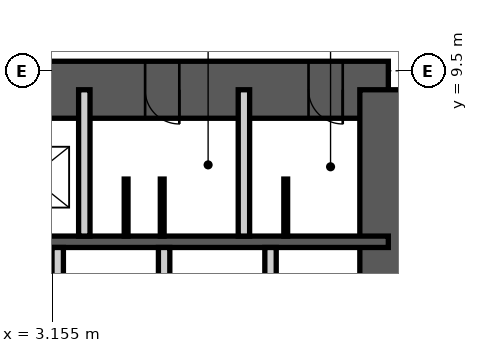
"""IFC4 building model, lengths in metres.
Left out: names, types, materials, properties, quantities, classifications, styles, units other than length and angle.
Written with IfcOpenShell. Run it as: python <this file> out.ifc"""

import sys

from ifc_helpers import new_model, si_unit, direction, frame, frame_2d, origin, place, context, subcontext, project, spatial, rectangle, extrude, element, fill, save


model = new_model("IFC4")
c1 = context("Model", 3, precision=1e-05, world=origin(), true_north=direction((0.0, 1.0)))
c2 = subcontext(c1, "Body", "Model", "MODEL_VIEW")
j1 = project(units=[si_unit("LENGTHUNIT", "METRE"), si_unit("PLANEANGLEUNIT", "RADIAN")], contexts=[c1])
p1 = place(None, origin())
s1 = spatial("IfcSite", under=j1, at=p1, CompositionType="ELEMENT")
p2 = place(p1, origin())
s2 = spatial("IfcBuilding", under=s1, at=p2, CompositionType="ELEMENT")
p3 = place(p2, frame((0.0, 0.0, -12.0)))
s3 = spatial("IfcBuildingStorey", under=s2, at=p3, CompositionType="ELEMENT", Elevation=-12.0)
p4 = place(p3, frame((-12.0, 9.0, -0.2), z_axis=(0.0, 0.0, 1.0), x_axis=(1.0, 0.0, 0.0)))
e1 = element("IfcWall", 1, at=p4, inside=s3, PredefinedType="SHEAR", context=c2, shape_type="SweptSolid", body=[
    extrude(rectangle(XDim=24.0, YDim=1.5, at=frame_2d((12.0, 0.0))), origin(), (0.0, 0.0, 1.0), 6.2),
])
p5 = place(p4, frame((10.4, 0.0, 0.2)))
e2 = element("IfcOpeningElement", 2, at=p5, cuts=e1, PredefinedType="OPENING", context=c2, shape_type="SweptSolid", body=[
    extrude(rectangle(XDim=1.0, YDim=2.1, at=frame_2d((0.5, 1.05))), frame((0.0, 0.76, 0.0), z_axis=(0.0, -1.0, 0.0), x_axis=(1.0, 0.0, 0.0)), (0.0, 0.0, 1.0), 1.52),
])
p6 = place(p4, frame((17.6, 0.0, 0.2)))
e3 = element("IfcOpeningElement", 3, at=p6, cuts=e1, PredefinedType="OPENING", context=c2, shape_type="SweptSolid", body=[
    extrude(rectangle(XDim=0.9, YDim=2.1, at=frame_2d((0.45, 1.05))), frame((0.0, 0.76, 0.0), z_axis=(0.0, -1.0, 0.0), x_axis=(1.0, 0.0, 0.0)), (0.0, 0.0, 1.0), 1.52),
])
p7 = place(p4, frame((21.9, 0.0, 0.2)))
e4 = element("IfcOpeningElement", 4, at=p7, cuts=e1, PredefinedType="OPENING", context=c2, shape_type="SweptSolid", body=[
    extrude(rectangle(XDim=0.9, YDim=2.1, at=frame_2d((0.45, 1.05))), frame((0.0, 0.76, 0.0), z_axis=(0.0, -1.0, 0.0), x_axis=(1.0, 0.0, 0.0)), (0.0, 0.0, 1.0), 1.52),
])
p8 = place(p3, frame((12.0, -9.0, -0.2), z_axis=(0.0, 0.0, 1.0), x_axis=(0.0, 1.0, 0.0)))
e5 = element("IfcWall", 5, at=p8, inside=s3, PredefinedType="SHEAR", context=c2, shape_type="SweptSolid", body=[
    extrude(rectangle(XDim=18.0, YDim=1.5, at=frame_2d((9.0, 0.0))), origin(), (0.0, 0.0, 1.0), 6.2),
])
p9 = place(p8, frame((8.1, 0.0, 0.2)))
e6 = element("IfcOpeningElement", 6, at=p9, cuts=e5, PredefinedType="OPENING", context=c2, shape_type="SweptSolid", body=[
    extrude(rectangle(XDim=1.8, YDim=2.1, at=frame_2d((0.9, 1.05))), frame((0.0, 0.76, 0.0), z_axis=(0.0, -1.0, 0.0), x_axis=(1.0, 0.0, 0.0)), (0.0, 0.0, 1.0), 1.52),
])
p10 = place(p3, frame((-12.0, 5.0, -0.2), z_axis=(0.0, 0.0, 1.0), x_axis=(1.0, 0.0, 0.0)))
e7 = element("IfcWall", 7, at=p10, inside=s3, PredefinedType="SHEAR", context=c2, shape_type="SweptSolid", body=[
    extrude(rectangle(XDim=24.0, YDim=0.3, at=frame_2d((12.0, 0.0))), origin(), (0.0, 0.0, 1.0), 6.2),
])
for number, where, z_axis, x_axis in (
    (8, (4.0, 5.15, 0.0), (0.0, 0.0, 1.0), (0.0, 1.0, 0.0)),
    (9, (8.2, 5.15, 0.0), (0.0, 0.0, 1.0), (0.0, 1.0, 0.0)),
):
    element("IfcWall", number, at=place(p3, frame(where, z_axis=z_axis, x_axis=x_axis)), inside=s3, PredefinedType="PARTITIONING", context=c2, shape_type="SweptSolid", body=[
        extrude(rectangle(XDim=3.85, YDim=0.3, at=frame_2d((1.925, 0.0))), origin(), (0.0, 0.0, 1.0), 5.78),
    ])
for number, where, z_axis, x_axis in (
    (10, (3.3, 2.2, 0.0), (0.0, 0.0, 1.0), (0.0, 1.0, 0.0)),
    (11, (6.1, 2.2, 0.0), (0.0, 0.0, 1.0), (0.0, 1.0, 0.0)),
    (12, (8.9, 2.2, 0.0), (0.0, 0.0, 1.0), (0.0, 1.0, 0.0)),
):
    element("IfcWall", number, at=place(p3, frame(where, z_axis=z_axis, x_axis=x_axis)), inside=s3, PredefinedType="PARTITIONING", context=c2, shape_type="SweptSolid", body=[
        extrude(rectangle(XDim=2.65, YDim=0.3, at=frame_2d((1.325, 0.0))), origin(), (0.0, 0.0, 1.0), 5.78),
    ])
for number, where, z_axis, x_axis in (
    (13, (5.1, 5.15, 0.0), (0.0, 0.0, 1.0), (0.0, 1.0, 0.0)),
    (14, (6.05, 5.15, 0.0), (0.0, 0.0, 1.0), (0.0, 1.0, 0.0)),
    (15, (9.3, 5.15, 0.0), (0.0, 0.0, 1.0), (0.0, 1.0, 0.0)),
):
    element("IfcWall", number, at=place(p3, frame(where, z_axis=z_axis, x_axis=x_axis)), inside=s3, PredefinedType="PARTITIONING", context=c2, shape_type="SweptSolid", body=[
        extrude(rectangle(XDim=1.5, YDim=0.1, at=frame_2d((0.75, 0.0))), origin(), (0.0, 0.0, 1.0), 2.1),
    ])
p11 = place(p6, origin())
e16 = element("IfcDoor", 16, at=p11, inside=s3, OperationType="SINGLE_SWING_RIGHT", PredefinedType="DOOR", context=c2, shape_type="SweptSolid", body=[
    extrude(rectangle(XDim=0.9, YDim=2.1, at=frame_2d((0.45, 1.05))), frame((0.0, 0.025, 0.0), z_axis=(0.0, -1.0, 0.0), x_axis=(1.0, 0.0, 0.0)), (0.0, 0.0, 1.0), 0.05),
])
fill(e3, e16)
p12 = place(p7, origin())
e17 = element("IfcDoor", 17, at=p12, inside=s3, OperationType="SINGLE_SWING_RIGHT", PredefinedType="DOOR", context=c2, shape_type="SweptSolid", body=[
    extrude(rectangle(XDim=0.9, YDim=2.1, at=frame_2d((0.45, 1.05))), frame((0.0, 0.025, 0.0), z_axis=(0.0, -1.0, 0.0), x_axis=(1.0, 0.0, 0.0)), (0.0, 0.0, 1.0), 0.05),
])
fill(e4, e17)
save(model, sys.argv[1])
